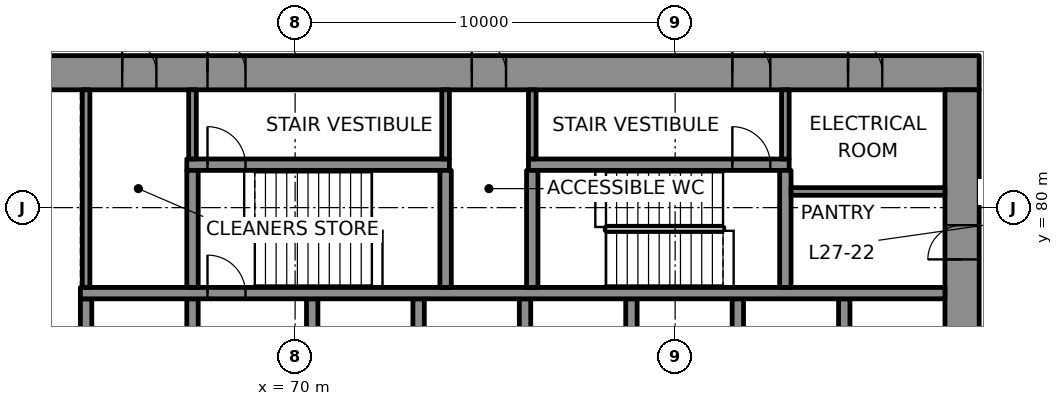
"""IFC4 building model, lengths in metres.
Left out: names, types, materials, properties, quantities, classifications, styles, units other than length and angle.
Written with IfcOpenShell. Run it as: python <this file> out.ifc"""

import sys

from ifc_helpers import new_model, si_unit, direction, frame, frame_2d, origin, place, context, subcontext, project, spatial, rectangle, extrude, element, fill, save


model = new_model("IFC4")
c1 = context("Model", 3, precision=1e-05, world=origin(), true_north=direction((0.0, 1.0)))
c2 = subcontext(c1, "Body", "Model", "MODEL_VIEW")
j1 = project(units=[si_unit("LENGTHUNIT", "METRE"), si_unit("PLANEANGLEUNIT", "RADIAN")], contexts=[c1])
p1 = place(None, origin())
s1 = spatial("IfcSite", under=j1, at=p1, CompositionType="ELEMENT")
p2 = place(p1, origin())
s2 = spatial("IfcBuilding", under=s1, at=p2, CompositionType="ELEMENT")
p3 = place(p2, frame((0.0, 0.0, 119.8)))
s3 = spatial("IfcBuildingStorey", under=s2, at=p3, CompositionType="ELEMENT", Elevation=119.8)
p4 = place(p3, frame((62.0, 83.55, 0.0), z_axis=(0.0, 0.0, 1.0), x_axis=(1.0, 0.0, 0.0)))
e1 = element("IfcWall", 1, at=p4, inside=s3, PredefinedType="SHEAR", context=c2, shape_type="SweptSolid", body=[
    extrude(rectangle(XDim=26.0, YDim=0.9, at=frame_2d((13.0, 0.0))), origin(), (0.0, 0.0, 1.0), 4.0),
])
p5 = place(p4, frame((5.695, 0.0, 0.0)))
e2 = element("IfcOpeningElement", 2, at=p5, cuts=e1, PredefinedType="OPENING", context=c2, shape_type="SweptSolid", body=[
    extrude(rectangle(XDim=1.0, YDim=2.1, at=frame_2d((0.5, 1.05))), frame((0.0, 0.46, 0.0), z_axis=(0.0, -1.0, 0.0), x_axis=(1.0, 0.0, 0.0)), (0.0, 0.0, 1.0), 0.92),
])
p6 = place(p4, frame((19.505, 0.0, 0.0)))
e3 = element("IfcOpeningElement", 3, at=p6, cuts=e1, PredefinedType="OPENING", context=c2, shape_type="SweptSolid", body=[
    extrude(rectangle(XDim=1.0, YDim=2.1, at=frame_2d((0.5, 1.05))), frame((0.0, 0.46, 0.0), z_axis=(0.0, -1.0, 0.0), x_axis=(1.0, 0.0, 0.0)), (0.0, 0.0, 1.0), 0.92),
])
p7 = place(p4, frame((3.45, 0.0, 0.0)))
e4 = element("IfcOpeningElement", 4, at=p7, cuts=e1, PredefinedType="OPENING", context=c2, shape_type="SweptSolid", body=[
    extrude(rectangle(XDim=0.9, YDim=2.1, at=frame_2d((0.45, 1.05))), frame((0.0, 0.46, 0.0), z_axis=(0.0, -1.0, 0.0), x_axis=(1.0, 0.0, 0.0)), (0.0, 0.0, 1.0), 0.92),
])
p8 = place(p4, frame((12.65, 0.0, 0.0)))
e5 = element("IfcOpeningElement", 5, at=p8, cuts=e1, PredefinedType="OPENING", context=c2, shape_type="SweptSolid", body=[
    extrude(rectangle(XDim=0.9, YDim=2.1, at=frame_2d((0.45, 1.05))), frame((0.0, 0.46, 0.0), z_axis=(0.0, -1.0, 0.0), x_axis=(1.0, 0.0, 0.0)), (0.0, 0.0, 1.0), 0.92),
])
p9 = place(p4, frame((22.55, 0.0, 0.0)))
e6 = element("IfcOpeningElement", 6, at=p9, cuts=e1, PredefinedType="OPENING", context=c2, shape_type="SweptSolid", body=[
    extrude(rectangle(XDim=0.9, YDim=2.1, at=frame_2d((0.45, 1.05))), frame((0.0, 0.46, 0.0), z_axis=(0.0, -1.0, 0.0), x_axis=(1.0, 0.0, 0.0)), (0.0, 0.0, 1.0), 0.92),
])
p10 = place(p3, frame((87.55, 66.9, 0.0), z_axis=(0.0, 0.0, 1.0), x_axis=(0.0, 1.0, 0.0)))
e7 = element("IfcWall", 7, at=p10, inside=s3, PredefinedType="SHEAR", context=c2, shape_type="SweptSolid", body=[
    extrude(rectangle(XDim=16.2, YDim=0.9, at=frame_2d((8.1, 0.0))), origin(), (0.0, 0.0, 1.0), 4.0),
])
p11 = place(p10, frame((5.5, 0.0, 0.0)))
e8 = element("IfcOpeningElement", 8, at=p11, cuts=e7, PredefinedType="OPENING", context=c2, shape_type="SweptSolid", body=[
    extrude(rectangle(XDim=1.8, YDim=2.1, at=frame_2d((0.9, 1.05))), frame((0.0, 0.46, 0.0), z_axis=(0.0, -1.0, 0.0), x_axis=(1.0, 0.0, 0.0)), (0.0, 0.0, 1.0), 0.92),
])
p12 = place(p10, frame((11.738, 0.0, 0.0)))
e9 = element("IfcOpeningElement", 9, at=p12, cuts=e7, PredefinedType="OPENING", context=c2, shape_type="SweptSolid", body=[
    extrude(rectangle(XDim=0.9, YDim=2.1, at=frame_2d((0.45, 1.05))), frame((0.0, 0.46, 0.0), z_axis=(0.0, -1.0, 0.0), x_axis=(1.0, 0.0, 0.0)), (0.0, 0.0, 1.0), 0.92),
])
for number, where, z_axis, x_axis in (
    (10, (64.5, 75.0, 0.0), (0.0, 0.0, 1.0), (0.0, 1.0, 0.0)),
    (11, (67.3, 75.0, 0.0), (0.0, 0.0, 1.0), (0.0, 1.0, 0.0)),
):
    element("IfcWall", number, at=place(p3, frame(where, z_axis=z_axis, x_axis=x_axis)), inside=s3, PredefinedType="SHEAR", context=c2, shape_type="SweptSolid", body=[
        extrude(rectangle(XDim=2.6, YDim=0.3, at=frame_2d((1.3, 0.0))), origin(), (0.0, 0.0, 1.0), 4.0),
    ])
p13 = place(p3, frame((70.45, 75.0, 0.0), z_axis=(0.0, 0.0, 1.0), x_axis=(0.0, 1.0, 0.0)))
e12 = element("IfcWall", 12, at=p13, inside=s3, PredefinedType="SHEAR", context=c2, shape_type="SweptSolid", body=[
    extrude(rectangle(XDim=2.6, YDim=0.3, at=frame_2d((1.3, 0.0))), origin(), (0.0, 0.0, 1.0), 4.0),
])
p14 = place(p13, frame((0.15, 0.0, 0.0)))
e13 = element("IfcOpeningElement", 13, at=p14, cuts=e12, PredefinedType="OPENING", context=c2, shape_type="SweptSolid", body=[
    extrude(rectangle(XDim=1.1, YDim=2.1, at=frame_2d((0.55, 1.05))), frame((0.0, 0.16, 0.0), z_axis=(0.0, -1.0, 0.0), x_axis=(1.0, 0.0, 0.0)), (0.0, 0.0, 1.0), 0.32),
])
for number, where, z_axis, x_axis in (
    (14, (73.25, 75.0, 0.0), (0.0, 0.0, 1.0), (0.0, 1.0, 0.0)),
    (15, (76.05, 75.0, 0.0), (0.0, 0.0, 1.0), (0.0, 1.0, 0.0)),
    (16, (78.85, 75.0, 0.0), (0.0, 0.0, 1.0), (0.0, 1.0, 0.0)),
    (17, (81.65, 75.0, 0.0), (0.0, 0.0, 1.0), (0.0, 1.0, 0.0)),
    (18, (84.45, 75.0, 0.0), (0.0, 0.0, 1.0), (0.0, 1.0, 0.0)),
):
    element("IfcWall", number, at=place(p3, frame(where, z_axis=z_axis, x_axis=x_axis)), inside=s3, PredefinedType="SHEAR", context=c2, shape_type="SweptSolid", body=[
        extrude(rectangle(XDim=2.6, YDim=0.3, at=frame_2d((1.3, 0.0))), origin(), (0.0, 0.0, 1.0), 4.0),
    ])
p15 = place(p3, frame((64.35, 77.75, 0.0), z_axis=(0.0, 0.0, 1.0), x_axis=(1.0, 0.0, 0.0)))
e19 = element("IfcWall", 19, at=p15, inside=s3, PredefinedType="SHEAR", context=c2, shape_type="SweptSolid", body=[
    extrude(rectangle(XDim=22.75, YDim=0.3, at=frame_2d((11.375, 0.0))), origin(), (0.0, 0.0, 1.0), 4.0),
])
p16 = place(p15, frame((3.345, 0.0, 0.0)))
e20 = element("IfcOpeningElement", 20, at=p16, cuts=e19, PredefinedType="OPENING", context=c2, shape_type="SweptSolid", body=[
    extrude(rectangle(XDim=1.0, YDim=2.1, at=frame_2d((0.5, 1.05))), frame((0.0, 0.16, 0.0), z_axis=(0.0, -1.0, 0.0), x_axis=(1.0, 0.0, 0.0)), (0.0, 0.0, 1.0), 0.32),
])
p17 = place(p3, frame((67.15, 81.13, 0.0), z_axis=(0.0, 0.0, 1.0), x_axis=(1.0, 0.0, 0.0)))
e21 = element("IfcWall", 21, at=p17, inside=s3, PredefinedType="SHEAR", context=c2, shape_type="SweptSolid", body=[
    extrude(rectangle(XDim=6.91, YDim=0.3, at=frame_2d((3.455, 0.0))), origin(), (0.0, 0.0, 1.0), 4.0),
])
p18 = place(p17, frame((0.545, 0.0, 0.0)))
e22 = element("IfcOpeningElement", 22, at=p18, cuts=e21, PredefinedType="OPENING", context=c2, shape_type="SweptSolid", body=[
    extrude(rectangle(XDim=1.0, YDim=2.1, at=frame_2d((0.5, 1.05))), frame((0.0, 0.16, 0.0), z_axis=(0.0, -1.0, 0.0), x_axis=(1.0, 0.0, 0.0)), (0.0, 0.0, 1.0), 0.32),
])
p19 = place(p3, frame((76.14, 81.13, 0.0), z_axis=(0.0, 0.0, 1.0), x_axis=(1.0, 0.0, 0.0)))
e23 = element("IfcWall", 23, at=p19, inside=s3, PredefinedType="SHEAR", context=c2, shape_type="SweptSolid", body=[
    extrude(rectangle(XDim=6.86, YDim=0.3, at=frame_2d((3.43, 0.0))), origin(), (0.0, 0.0, 1.0), 4.0),
])
p20 = place(p19, frame((5.365, 0.0, 0.0)))
e24 = element("IfcOpeningElement", 24, at=p20, cuts=e23, PredefinedType="OPENING", context=c2, shape_type="SweptSolid", body=[
    extrude(rectangle(XDim=1.0, YDim=2.1, at=frame_2d((0.5, 1.05))), frame((0.0, 0.16, 0.0), z_axis=(0.0, -1.0, 0.0), x_axis=(1.0, 0.0, 0.0)), (0.0, 0.0, 1.0), 0.32),
])
for number, where, z_axis, x_axis in (
    (25, (67.3, 77.9, 0.0), (0.0, 0.0, 1.0), (0.0, 1.0, 0.0)),
    (26, (73.96, 77.9, 0.0), (0.0, 0.0, 1.0), (0.0, 1.0, 0.0)),
    (27, (76.24, 77.9, 0.0), (0.0, 0.0, 1.0), (0.0, 1.0, 0.0)),
    (28, (82.9, 77.9, 0.0), (0.0, 0.0, 1.0), (0.0, 1.0, 0.0)),
):
    element("IfcWall", number, at=place(p3, frame(where, z_axis=z_axis, x_axis=x_axis)), inside=s3, PredefinedType="SHEAR", context=c2, shape_type="SweptSolid", body=[
        extrude(rectangle(XDim=3.08, YDim=0.3, at=frame_2d((1.54, 0.0))), origin(), (0.0, 0.0, 1.0), 4.0),
    ])
p21 = place(p3, frame((69.117, 112.258, 0.0), z_axis=(0.0, 0.0, 1.0), x_axis=(-0.500000992643, -0.866024830681, 0.0)))
e29 = element("IfcWall", 29, at=p21, inside=s3, PredefinedType="SOLIDWALL", context=c2, shape_type="SweptSolid", body=[
    extrude(rectangle(XDim=58.649, YDim=0.8, at=frame_2d((29.325, 0.0))), origin(), (0.0, 0.0, 1.0), 0.9),
])
p22 = place(p3, frame((83.05, 80.425, 0.0), z_axis=(0.0, 0.0, 1.0), x_axis=(1.0, 0.0, 0.0)))
e30 = element("IfcWall", 30, at=p22, inside=s3, PredefinedType="PARTITIONING", context=c2, shape_type="SweptSolid", body=[
    extrude(rectangle(XDim=4.05, YDim=0.2, at=frame_2d((2.025, 0.0))), origin(), (0.0, 0.0, 1.0), 4.0),
])
p23 = place(p3, frame((64.5, 77.9, 0.0), z_axis=(0.0, 0.0, 1.0), x_axis=(0.0, 1.0, 0.0)))
e31 = element("IfcWall", 31, at=p23, inside=s3, PredefinedType="PARTITIONING", context=c2, shape_type="SweptSolid", body=[
    extrude(rectangle(XDim=5.2, YDim=0.2, at=frame_2d((2.6, 0.0))), origin(), (0.0, 0.0, 1.0), 4.0),
])
for number, where, z_axis, x_axis in (
    (32, (67.3, 81.28, 0.0), (0.0, 0.0, 1.0), (0.0, 1.0, 0.0)),
    (33, (73.96, 81.28, 0.0), (0.0, 0.0, 1.0), (0.0, 1.0, 0.0)),
    (34, (76.24, 81.28, 0.0), (0.0, 0.0, 1.0), (0.0, 1.0, 0.0)),
    (35, (82.9, 81.28, 0.0), (0.0, 0.0, 1.0), (0.0, 1.0, 0.0)),
):
    element("IfcWall", number, at=place(p3, frame(where, z_axis=z_axis, x_axis=x_axis)), inside=s3, PredefinedType="PARTITIONING", context=c2, shape_type="SweptSolid", body=[
        extrude(rectangle(XDim=1.82, YDim=0.2, at=frame_2d((0.91, 0.0))), origin(), (0.0, 0.0, 1.0), 4.0),
    ])
p24 = place(p16, origin())
e36 = element("IfcDoor", 36, at=p24, inside=s3, OperationType="SINGLE_SWING_LEFT", PredefinedType="DOOR", context=c2, shape_type="SweptSolid", body=[
    extrude(rectangle(XDim=1.0, YDim=2.1, at=frame_2d((0.5, 1.05))), frame((0.0, 0.025, 0.0), z_axis=(0.0, -1.0, 0.0), x_axis=(1.0, 0.0, 0.0)), (0.0, 0.0, 1.0), 0.05),
])
fill(e20, e36)
p25 = place(p18, origin())
e37 = element("IfcDoor", 37, at=p25, inside=s3, OperationType="SINGLE_SWING_RIGHT", PredefinedType="DOOR", context=c2, shape_type="SweptSolid", body=[
    extrude(rectangle(XDim=1.0, YDim=2.1, at=frame_2d((0.5, 1.05))), frame((0.0, 0.025, 0.0), z_axis=(0.0, -1.0, 0.0), x_axis=(1.0, 0.0, 0.0)), (0.0, 0.0, 1.0), 0.05),
])
fill(e22, e37)
p26 = place(p5, origin())
e38 = element("IfcDoor", 38, at=p26, inside=s3, OperationType="SINGLE_SWING_LEFT", PredefinedType="DOOR", context=c2, shape_type="SweptSolid", body=[
    extrude(rectangle(XDim=1.0, YDim=2.1, at=frame_2d((0.5, 1.05))), frame((0.0, 0.17, 0.0), z_axis=(0.0, -1.0, 0.0), x_axis=(1.0, 0.0, 0.0)), (0.0, 0.0, 1.0), 0.34),
])
fill(e2, e38)
p27 = place(p20, origin())
e39 = element("IfcDoor", 39, at=p27, inside=s3, OperationType="SINGLE_SWING_RIGHT", PredefinedType="DOOR", context=c2, shape_type="SweptSolid", body=[
    extrude(rectangle(XDim=1.0, YDim=2.1, at=frame_2d((0.5, 1.05))), frame((0.0, 0.025, 0.0), z_axis=(0.0, -1.0, 0.0), x_axis=(1.0, 0.0, 0.0)), (0.0, 0.0, 1.0), 0.05),
])
fill(e24, e39)
p28 = place(p6, origin())
e40 = element("IfcDoor", 40, at=p28, inside=s3, OperationType="SINGLE_SWING_LEFT", PredefinedType="DOOR", context=c2, shape_type="SweptSolid", body=[
    extrude(rectangle(XDim=1.0, YDim=2.1, at=frame_2d((0.5, 1.05))), frame((0.0, 0.17, 0.0), z_axis=(0.0, -1.0, 0.0), x_axis=(1.0, 0.0, 0.0)), (0.0, 0.0, 1.0), 0.34),
])
fill(e3, e40)
p29 = place(p7, origin())
e41 = element("IfcDoor", 41, at=p29, inside=s3, OperationType="SINGLE_SWING_RIGHT", PredefinedType="DOOR", context=c2, shape_type="SweptSolid", body=[
    extrude(rectangle(XDim=0.9, YDim=2.1, at=frame_2d((0.45, 1.05))), frame((0.0, 0.17, 0.0), z_axis=(0.0, -1.0, 0.0), x_axis=(1.0, 0.0, 0.0)), (0.0, 0.0, 1.0), 0.34),
])
fill(e4, e41)
p30 = place(p8, origin())
e42 = element("IfcDoor", 42, at=p30, inside=s3, OperationType="SINGLE_SWING_LEFT", PredefinedType="DOOR", context=c2, shape_type="SweptSolid", body=[
    extrude(rectangle(XDim=0.9, YDim=2.1, at=frame_2d((0.45, 1.05))), frame((0.0, 0.17, 0.0), z_axis=(0.0, -1.0, 0.0), x_axis=(1.0, 0.0, 0.0)), (0.0, 0.0, 1.0), 0.34),
])
fill(e5, e42)
p31 = place(p12, origin())
e43 = element("IfcDoor", 43, at=p31, inside=s3, OperationType="SINGLE_SWING_RIGHT", PredefinedType="DOOR", context=c2, shape_type="SweptSolid", body=[
    extrude(rectangle(XDim=0.9, YDim=2.1, at=frame_2d((0.45, 1.05))), frame((0.0, 0.17, 0.0), z_axis=(0.0, -1.0, 0.0), x_axis=(1.0, 0.0, 0.0)), (0.0, 0.0, 1.0), 0.34),
])
fill(e9, e43)
p32 = place(p9, origin())
e44 = element("IfcDoor", 44, at=p32, inside=s3, OperationType="SINGLE_SWING_LEFT", PredefinedType="DOOR", context=c2, shape_type="SweptSolid", body=[
    extrude(rectangle(XDim=0.9, YDim=2.1, at=frame_2d((0.45, 1.05))), frame((0.0, 0.17, 0.0), z_axis=(0.0, -1.0, 0.0), x_axis=(1.0, 0.0, 0.0)), (0.0, 0.0, 1.0), 0.34),
])
fill(e6, e44)
save(model, sys.argv[1])
